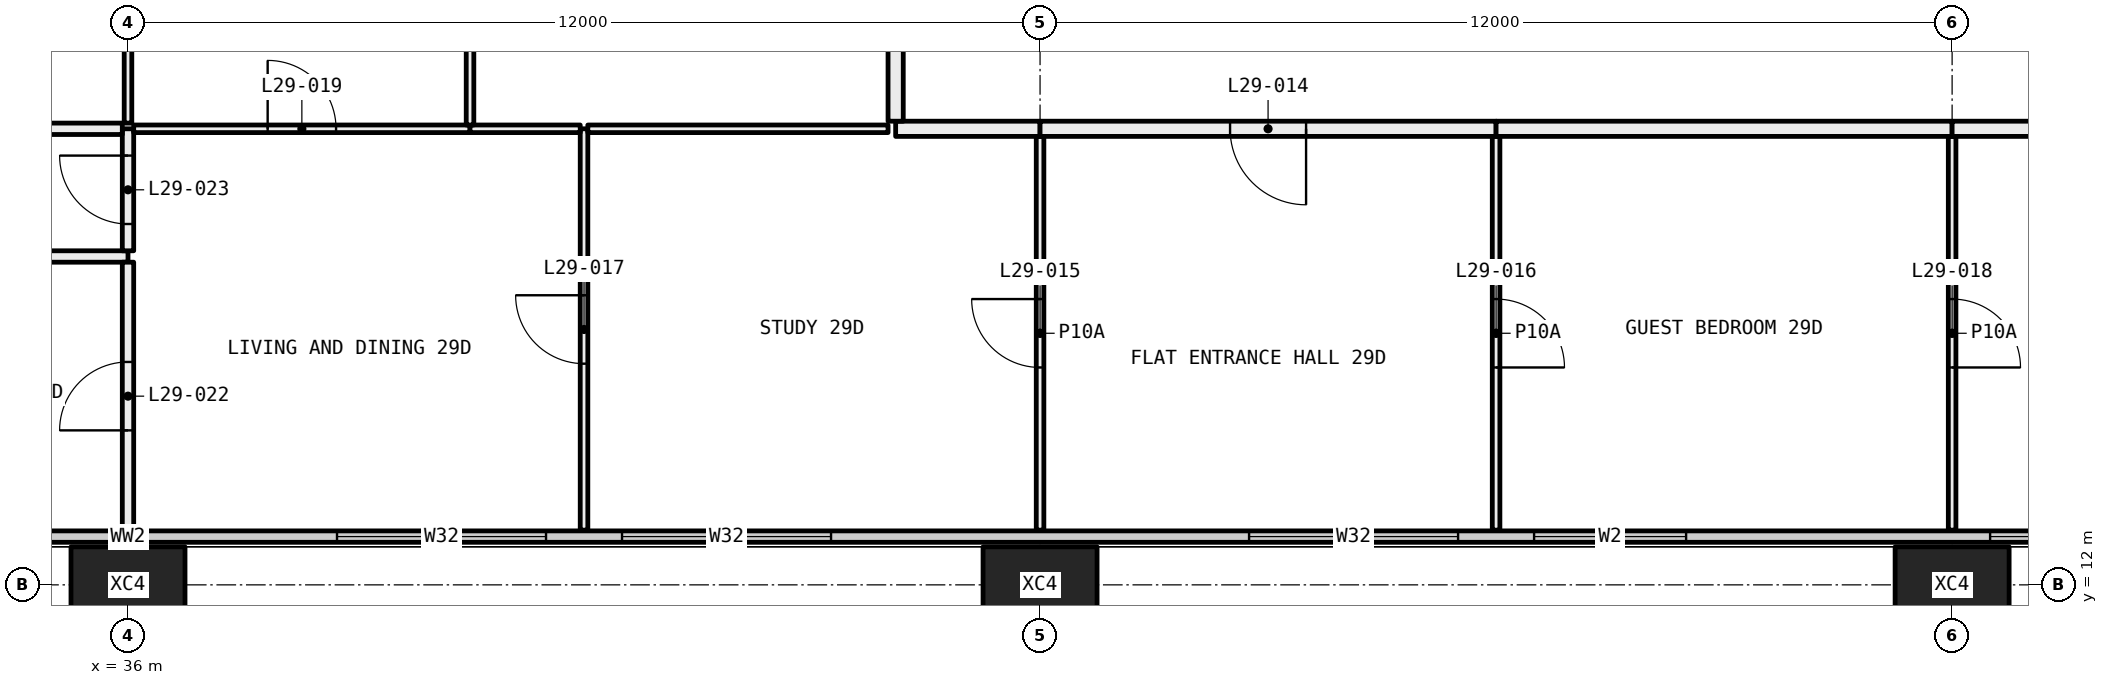
"""IFC4 building model, lengths in metres.
Left out: names, types, materials, properties, quantities, classifications, styles, units other than length and angle.
Written with IfcOpenShell. Run it as: python <this file> out.ifc"""

import sys

from ifc_helpers import new_model, si_unit, direction, frame, frame_2d, origin, origin_2d, place, context, subcontext, project, spatial, rectangle, hollow_rectangle, extrude, element, fill, save


model = new_model("IFC4")
c1 = context("Model", 3, precision=1e-05, world=origin(), true_north=direction((0.0, 1.0)))
c2 = subcontext(c1, "Body", "Model", "MODEL_VIEW")
j1 = project(units=[si_unit("LENGTHUNIT", "METRE"), si_unit("PLANEANGLEUNIT", "RADIAN")], contexts=[c1])
p1 = place(None, origin())
s1 = spatial("IfcSite", under=j1, at=p1, CompositionType="ELEMENT")
p2 = place(p1, origin())
s2 = spatial("IfcBuilding", under=s1, at=p2, CompositionType="ELEMENT")
p3 = place(p2, frame((0.0, 0.0, 113.85)))
s3 = spatial("IfcBuildingStorey", under=s2, at=p3, CompositionType="ELEMENT", Elevation=113.85)
for number, where, z_axis, x_axis in (
    (1, (36.0, 12.0, -0.4), (0.0, 0.0, 1.0), (1.0, 0.0, 0.0)),
    (2, (48.0, 12.0, -0.4), (0.0, 0.0, 1.0), (1.0, 0.0, 0.0)),
    (3, (60.0, 12.0, -0.4), (0.0, 0.0, 1.0), (1.0, 0.0, 0.0)),
):
    element("IfcColumn", number, at=place(p3, frame(where, z_axis=z_axis, x_axis=x_axis)), inside=s3, PredefinedType="COLUMN", context=c2, shape_type="SweptSolid", body=[
        extrude(hollow_rectangle(XDim=1.5, YDim=1.0, WallThickness=0.06, at=origin_2d()), origin(), (0.0, 0.0, 1.0), 3.45),
    ])
p4 = place(p3, frame((6.56, 12.635, 0.0), z_axis=(0.0, 0.0, 1.0), x_axis=(1.0, 0.0, 0.0)))
e4 = element("IfcWall", 4, at=p4, inside=s3, PredefinedType="ELEMENTEDWALL", context=c2, shape_type="SweptSolid", body=[
    extrude(rectangle(XDim=58.88, YDim=0.15, at=frame_2d((29.44, 0.0))), origin(), (0.0, 0.0, 1.0), 3.05),
])
p5 = place(p4, frame((0.44, 0.0, 0.45)))
e5 = element("IfcOpeningElement", 5, at=p5, cuts=e4, PredefinedType="OPENING", context=c2, shape_type="SweptSolid", body=[
    extrude(rectangle(XDim=4.5, YDim=2.55, at=frame_2d((2.25, 1.275))), frame((0.0, 0.085, 0.0), z_axis=(0.0, -1.0, 0.0), x_axis=(1.0, 0.0, 0.0)), (0.0, 0.0, 1.0), 0.17),
])
p6 = place(p4, frame((8.19, 0.0, 0.45)))
e6 = element("IfcOpeningElement", 6, at=p6, cuts=e4, PredefinedType="OPENING", context=c2, shape_type="SweptSolid", body=[
    extrude(rectangle(XDim=2.75, YDim=2.55, at=frame_2d((1.375, 1.275))), frame((0.0, 0.085, 0.0), z_axis=(0.0, -1.0, 0.0), x_axis=(1.0, 0.0, 0.0)), (0.0, 0.0, 1.0), 0.17),
])
p7 = place(p4, frame((11.94, 0.0, 0.45)))
e7 = element("IfcOpeningElement", 7, at=p7, cuts=e4, PredefinedType="OPENING", context=c2, shape_type="SweptSolid", body=[
    extrude(rectangle(XDim=2.75, YDim=2.55, at=frame_2d((1.375, 1.275))), frame((0.0, 0.085, 0.0), z_axis=(0.0, -1.0, 0.0), x_axis=(1.0, 0.0, 0.0)), (0.0, 0.0, 1.0), 0.17),
])
p8 = place(p4, frame((20.19, 0.0, 0.45)))
e8 = element("IfcOpeningElement", 8, at=p8, cuts=e4, PredefinedType="OPENING", context=c2, shape_type="SweptSolid", body=[
    extrude(rectangle(XDim=2.75, YDim=2.55, at=frame_2d((1.375, 1.275))), frame((0.0, 0.085, 0.0), z_axis=(0.0, -1.0, 0.0), x_axis=(1.0, 0.0, 0.0)), (0.0, 0.0, 1.0), 0.17),
])
p9 = place(p4, frame((23.94, 0.0, 0.45)))
e9 = element("IfcOpeningElement", 9, at=p9, cuts=e4, PredefinedType="OPENING", context=c2, shape_type="SweptSolid", body=[
    extrude(rectangle(XDim=2.0, YDim=2.55, at=frame_2d((1.0, 1.275))), frame((0.0, 0.085, 0.0), z_axis=(0.0, -1.0, 0.0), x_axis=(1.0, 0.0, 0.0)), (0.0, 0.0, 1.0), 0.17),
])
p10 = place(p4, frame((32.19, 0.0, 0.45)))
e10 = element("IfcOpeningElement", 10, at=p10, cuts=e4, PredefinedType="OPENING", context=c2, shape_type="SweptSolid", body=[
    extrude(rectangle(XDim=2.75, YDim=2.55, at=frame_2d((1.375, 1.275))), frame((0.0, 0.085, 0.0), z_axis=(0.0, -1.0, 0.0), x_axis=(1.0, 0.0, 0.0)), (0.0, 0.0, 1.0), 0.17),
])
p11 = place(p4, frame((35.94, 0.0, 0.45)))
e11 = element("IfcOpeningElement", 11, at=p11, cuts=e4, PredefinedType="OPENING", context=c2, shape_type="SweptSolid", body=[
    extrude(rectangle(XDim=2.75, YDim=2.55, at=frame_2d((1.375, 1.275))), frame((0.0, 0.085, 0.0), z_axis=(0.0, -1.0, 0.0), x_axis=(1.0, 0.0, 0.0)), (0.0, 0.0, 1.0), 0.17),
])
p12 = place(p4, frame((44.19, 0.0, 0.45)))
e12 = element("IfcOpeningElement", 12, at=p12, cuts=e4, PredefinedType="OPENING", context=c2, shape_type="SweptSolid", body=[
    extrude(rectangle(XDim=2.75, YDim=2.55, at=frame_2d((1.375, 1.275))), frame((0.0, 0.085, 0.0), z_axis=(0.0, -1.0, 0.0), x_axis=(1.0, 0.0, 0.0)), (0.0, 0.0, 1.0), 0.17),
])
p13 = place(p4, frame((47.94, 0.0, 0.45)))
e13 = element("IfcOpeningElement", 13, at=p13, cuts=e4, PredefinedType="OPENING", context=c2, shape_type="SweptSolid", body=[
    extrude(rectangle(XDim=2.0, YDim=2.55, at=frame_2d((1.0, 1.275))), frame((0.0, 0.085, 0.0), z_axis=(0.0, -1.0, 0.0), x_axis=(1.0, 0.0, 0.0)), (0.0, 0.0, 1.0), 0.17),
])
p14 = place(p4, frame((53.94, 0.0, 0.45)))
e14 = element("IfcOpeningElement", 14, at=p14, cuts=e4, PredefinedType="OPENING", context=c2, shape_type="SweptSolid", body=[
    extrude(rectangle(XDim=4.5, YDim=2.55, at=frame_2d((2.25, 1.275))), frame((0.0, 0.085, 0.0), z_axis=(0.0, -1.0, 0.0), x_axis=(1.0, 0.0, 0.0)), (0.0, 0.0, 1.0), 0.17),
])
p15 = place(p3, frame((36.0, 16.32, 0.0), z_axis=(0.0, 0.0, 1.0), x_axis=(-1.0, 0.0, 0.0)))
e15 = element("IfcWall", 15, at=p15, inside=s3, PredefinedType="PARTITIONING", context=c2, shape_type="SweptSolid", body=[
    extrude(rectangle(XDim=5.9, YDim=0.15, at=frame_2d((2.95, 0.0))), origin(), (0.0, 0.0, 1.0), 2.45),
])
p16 = place(p3, frame((36.0, 12.72, 0.0), z_axis=(0.0, 0.0, 1.0), x_axis=(0.0, 1.0, 0.0)))
e16 = element("IfcWall", 16, at=p16, inside=s3, PredefinedType="PARTITIONING", context=c2, shape_type="SweptSolid", body=[
    extrude(rectangle(XDim=3.525, YDim=0.15, at=frame_2d((1.763, 0.0))), origin(), (0.0, 0.0, 1.0), 2.45),
])
p17 = place(p16, frame((1.312, 0.0, 0.0)))
e17 = element("IfcOpeningElement", 17, at=p17, cuts=e16, PredefinedType="OPENING", context=c2, shape_type="SweptSolid", body=[
    extrude(rectangle(XDim=0.9, YDim=2.1, at=frame_2d((0.45, 1.05))), frame((0.0, 0.085, 0.0), z_axis=(0.0, -1.0, 0.0), x_axis=(1.0, 0.0, 0.0)), (0.0, 0.0, 1.0), 0.17),
])
p18 = place(p3, frame((36.0, 16.395, 0.0), z_axis=(0.0, 0.0, 1.0), x_axis=(0.0, 1.0, 0.0)))
e18 = element("IfcWall", 18, at=p18, inside=s3, PredefinedType="PARTITIONING", context=c2, shape_type="SweptSolid", body=[
    extrude(rectangle(XDim=1.605, YDim=0.15, at=frame_2d((0.802, 0.0))), origin(), (0.0, 0.0, 1.0), 2.45),
])
p19 = place(p18, frame((0.353, 0.0, 0.0)))
e19 = element("IfcOpeningElement", 19, at=p19, cuts=e18, PredefinedType="OPENING", context=c2, shape_type="SweptSolid", body=[
    extrude(rectangle(XDim=0.9, YDim=2.1, at=frame_2d((0.45, 1.05))), frame((0.0, 0.085, 0.0), z_axis=(0.0, -1.0, 0.0), x_axis=(1.0, 0.0, 0.0)), (0.0, 0.0, 1.0), 0.17),
])
p20 = place(p3, frame((35.925, 18.0, 0.0), z_axis=(0.0, 0.0, 1.0), x_axis=(-1.0, 0.0, 0.0)))
e20 = element("IfcWall", 20, at=p20, inside=s3, PredefinedType="PARTITIONING", context=c2, shape_type="SweptSolid", body=[
    extrude(rectangle(XDim=5.825, YDim=0.15, at=frame_2d((2.913, 0.0))), origin(), (0.0, 0.0, 1.0), 2.45),
])
p21 = place(p3, frame((42.0, 12.72, 0.0), z_axis=(0.0, 0.0, 1.0), x_axis=(0.0, 1.0, 0.0)))
e21 = element("IfcWall", 21, at=p21, inside=s3, PredefinedType="PARTITIONING", context=c2, shape_type="SweptSolid", body=[
    extrude(rectangle(XDim=5.28, YDim=0.1, at=frame_2d((2.64, 0.0))), origin(), (0.0, 0.0, 1.0), 3.05),
])
p22 = place(p21, frame((2.19, 0.0, 0.0)))
e22 = element("IfcOpeningElement", 22, at=p22, cuts=e21, PredefinedType="OPENING", context=c2, shape_type="SweptSolid", body=[
    extrude(rectangle(XDim=0.9, YDim=2.1, at=frame_2d((0.45, 1.05))), frame((0.0, 0.06, 0.0), z_axis=(0.0, -1.0, 0.0), x_axis=(1.0, 0.0, 0.0)), (0.0, 0.0, 1.0), 0.12),
])
p23 = place(p3, frame((40.5, 18.0, 0.0), z_axis=(0.0, 0.0, 1.0), x_axis=(-1.0, 0.0, 0.0)))
e23 = element("IfcWall", 23, at=p23, inside=s3, PredefinedType="PARTITIONING", context=c2, shape_type="SweptSolid", body=[
    extrude(rectangle(XDim=4.425, YDim=0.1, at=frame_2d((2.212, 0.0))), origin(), (0.0, 0.0, 1.0), 2.45),
])
p24 = place(p23, frame((1.762, 0.0, 0.0)))
e24 = element("IfcOpeningElement", 24, at=p24, cuts=e23, PredefinedType="OPENING", context=c2, shape_type="SweptSolid", body=[
    extrude(rectangle(XDim=0.9, YDim=2.1, at=frame_2d((0.45, 1.05))), frame((0.0, 0.06, 0.0), z_axis=(0.0, -1.0, 0.0), x_axis=(1.0, 0.0, 0.0)), (0.0, 0.0, 1.0), 0.12),
])
p25 = place(p3, frame((41.95, 18.0, 0.0), z_axis=(0.0, 0.0, 1.0), x_axis=(-1.0, 0.0, 0.0)))
e25 = element("IfcWall", 25, at=p25, inside=s3, PredefinedType="PARTITIONING", context=c2, shape_type="SweptSolid", body=[
    extrude(rectangle(XDim=1.45, YDim=0.1, at=frame_2d((0.725, 0.0))), origin(), (0.0, 0.0, 1.0), 3.05),
])
p26 = place(p3, frame((48.0, 12.72, 0.0), z_axis=(0.0, 0.0, 1.0), x_axis=(0.0, 1.0, 0.0)))
e26 = element("IfcWall", 26, at=p26, inside=s3, PredefinedType="PARTITIONING", context=c2, shape_type="SweptSolid", body=[
    extrude(rectangle(XDim=5.18, YDim=0.1, at=frame_2d((2.59, 0.0))), origin(), (0.0, 0.0, 1.0), 3.05),
])
p27 = place(p26, frame((2.14, 0.0, 0.0)))
e27 = element("IfcOpeningElement", 27, at=p27, cuts=e26, PredefinedType="OPENING", context=c2, shape_type="SweptSolid", body=[
    extrude(rectangle(XDim=0.9, YDim=2.1, at=frame_2d((0.45, 1.05))), frame((0.0, 0.06, 0.0), z_axis=(0.0, -1.0, 0.0), x_axis=(1.0, 0.0, 0.0)), (0.0, 0.0, 1.0), 0.12),
])
p28 = place(p3, frame((46.0, 18.0, 0.0), z_axis=(0.0, 0.0, 1.0), x_axis=(-1.0, 0.0, 0.0)))
e28 = element("IfcWall", 28, at=p28, inside=s3, PredefinedType="PARTITIONING", context=c2, shape_type="SweptSolid", body=[
    extrude(rectangle(XDim=3.95, YDim=0.1, at=frame_2d((1.975, 0.0))), origin(), (0.0, 0.0, 1.0), 3.05),
])
p29 = place(p3, frame((48.0, 18.0, 0.0), z_axis=(0.0, 0.0, 1.0), x_axis=(-1.0, 0.0, 0.0)))
e29 = element("IfcWall", 29, at=p29, inside=s3, PredefinedType="PARTITIONING", context=c2, shape_type="SweptSolid", body=[
    extrude(rectangle(XDim=1.9, YDim=0.2, at=frame_2d((0.95, 0.0))), origin(), (0.0, 0.0, 1.0), 3.05),
])
p30 = place(p3, frame((54.0, 12.72, 0.0), z_axis=(0.0, 0.0, 1.0), x_axis=(0.0, 1.0, 0.0)))
e30 = element("IfcWall", 30, at=p30, inside=s3, PredefinedType="PARTITIONING", context=c2, shape_type="SweptSolid", body=[
    extrude(rectangle(XDim=5.18, YDim=0.1, at=frame_2d((2.59, 0.0))), origin(), (0.0, 0.0, 1.0), 3.05),
])
p31 = place(p30, frame((2.14, 0.0, 0.0)))
e31 = element("IfcOpeningElement", 31, at=p31, cuts=e30, PredefinedType="OPENING", context=c2, shape_type="SweptSolid", body=[
    extrude(rectangle(XDim=0.9, YDim=2.1, at=frame_2d((0.45, 1.05))), frame((0.0, 0.06, 0.0), z_axis=(0.0, -1.0, 0.0), x_axis=(1.0, 0.0, 0.0)), (0.0, 0.0, 1.0), 0.12),
])
p32 = place(p3, frame((54.0, 18.0, 0.0), z_axis=(0.0, 0.0, 1.0), x_axis=(-1.0, 0.0, 0.0)))
e32 = element("IfcWall", 32, at=p32, inside=s3, PredefinedType="PARTITIONING", context=c2, shape_type="SweptSolid", body=[
    extrude(rectangle(XDim=6.0, YDim=0.2, at=frame_2d((3.0, 0.0))), origin(), (0.0, 0.0, 1.0), 3.05),
])
p33 = place(p32, frame((2.5, 0.0, 0.0)))
e33 = element("IfcOpeningElement", 33, at=p33, cuts=e32, PredefinedType="OPENING", context=c2, shape_type="SweptSolid", body=[
    extrude(rectangle(XDim=1.0, YDim=2.1, at=frame_2d((0.5, 1.05))), frame((0.0, 0.11, 0.0), z_axis=(0.0, -1.0, 0.0), x_axis=(1.0, 0.0, 0.0)), (0.0, 0.0, 1.0), 0.22),
])
p34 = place(p3, frame((60.0, 12.72, 0.0), z_axis=(0.0, 0.0, 1.0), x_axis=(0.0, 1.0, 0.0)))
e34 = element("IfcWall", 34, at=p34, inside=s3, PredefinedType="PARTITIONING", context=c2, shape_type="SweptSolid", body=[
    extrude(rectangle(XDim=5.18, YDim=0.1, at=frame_2d((2.59, 0.0))), origin(), (0.0, 0.0, 1.0), 3.05),
])
p35 = place(p34, frame((2.14, 0.0, 0.0)))
e35 = element("IfcOpeningElement", 35, at=p35, cuts=e34, PredefinedType="OPENING", context=c2, shape_type="SweptSolid", body=[
    extrude(rectangle(XDim=0.9, YDim=2.1, at=frame_2d((0.45, 1.05))), frame((0.0, 0.06, 0.0), z_axis=(0.0, -1.0, 0.0), x_axis=(1.0, 0.0, 0.0)), (0.0, 0.0, 1.0), 0.12),
])
p36 = place(p3, frame((60.0, 18.0, 0.0), z_axis=(0.0, 0.0, 1.0), x_axis=(-1.0, 0.0, 0.0)))
e36 = element("IfcWall", 36, at=p36, inside=s3, PredefinedType="PARTITIONING", context=c2, shape_type="SweptSolid", body=[
    extrude(rectangle(XDim=6.0, YDim=0.2, at=frame_2d((3.0, 0.0))), origin(), (0.0, 0.0, 1.0), 3.05),
])
p37 = place(p3, frame((61.9, 18.0, 0.0), z_axis=(0.0, 0.0, 1.0), x_axis=(-1.0, 0.0, 0.0)))
e37 = element("IfcWall", 37, at=p37, inside=s3, PredefinedType="PARTITIONING", context=c2, shape_type="SweptSolid", body=[
    extrude(rectangle(XDim=1.9, YDim=0.2, at=frame_2d((0.95, 0.0))), origin(), (0.0, 0.0, 1.0), 3.05),
])
p38 = place(p3, frame((36.0, 18.075, 0.0), z_axis=(0.0, 0.0, 1.0), x_axis=(0.0, 1.0, 0.0)))
e38 = element("IfcWall", 38, at=p38, inside=s3, PredefinedType="PARTITIONING", context=c2, shape_type="SweptSolid", body=[
    extrude(rectangle(XDim=5.175, YDim=0.1, at=frame_2d((2.587, 0.0))), origin(), (0.0, 0.0, 1.0), 2.45),
])
p39 = place(p38, frame((2.137, 0.0, 0.0)))
e39 = element("IfcOpeningElement", 39, at=p39, cuts=e38, PredefinedType="OPENING", context=c2, shape_type="SweptSolid", body=[
    extrude(rectangle(XDim=0.9, YDim=2.1, at=frame_2d((0.45, 1.05))), frame((0.0, 0.06, 0.0), z_axis=(0.0, -1.0, 0.0), x_axis=(1.0, 0.0, 0.0)), (0.0, 0.0, 1.0), 0.12),
])
p40 = place(p3, frame((40.5, 18.05, 0.0), z_axis=(0.0, 0.0, 1.0), x_axis=(0.0, 1.0, 0.0)))
e40 = element("IfcWall", 40, at=p40, inside=s3, PredefinedType="PARTITIONING", context=c2, shape_type="SweptSolid", body=[
    extrude(rectangle(XDim=6.25, YDim=0.1, at=frame_2d((3.125, 0.0))), origin(), (0.0, 0.0, 1.0), 2.45),
])
p41 = place(p40, frame((2.675, 0.0, 0.0)))
e41 = element("IfcOpeningElement", 41, at=p41, cuts=e40, PredefinedType="OPENING", context=c2, shape_type="SweptSolid", body=[
    extrude(rectangle(XDim=0.9, YDim=2.1, at=frame_2d((0.45, 1.05))), frame((0.0, 0.06, 0.0), z_axis=(0.0, -1.0, 0.0), x_axis=(1.0, 0.0, 0.0)), (0.0, 0.0, 1.0), 0.12),
])
p42 = place(p3, frame((46.1, 18.1, 0.0), z_axis=(0.0, 0.0, 1.0), x_axis=(0.0, 1.0, 0.0)))
e42 = element("IfcWall", 42, at=p42, inside=s3, PredefinedType="PARTITIONING", context=c2, shape_type="SweptSolid", body=[
    extrude(rectangle(XDim=6.2, YDim=0.2, at=frame_2d((3.1, 0.0))), origin(), (0.0, 0.0, 1.0), 2.45),
])
p43 = place(p10, origin())
e43 = element("IfcWindow", 43, at=p43, inside=s3, PartitioningType="SINGLE_PANEL", PredefinedType="WINDOW", context=c2, shape_type="SweptSolid", body=[
    extrude(rectangle(XDim=2.75, YDim=2.55, at=frame_2d((1.375, 1.275))), frame((0.0, 0.03, 0.0), z_axis=(0.0, -1.0, 0.0), x_axis=(1.0, 0.0, 0.0)), (0.0, 0.0, 1.0), 0.06),
])
fill(e10, e43)
p44 = place(p11, origin())
e44 = element("IfcWindow", 44, at=p44, inside=s3, PartitioningType="SINGLE_PANEL", PredefinedType="WINDOW", context=c2, shape_type="SweptSolid", body=[
    extrude(rectangle(XDim=2.75, YDim=2.55, at=frame_2d((1.375, 1.275))), frame((0.0, 0.03, 0.0), z_axis=(0.0, -1.0, 0.0), x_axis=(1.0, 0.0, 0.0)), (0.0, 0.0, 1.0), 0.06),
])
fill(e11, e44)
p45 = place(p12, origin())
e45 = element("IfcWindow", 45, at=p45, inside=s3, PartitioningType="SINGLE_PANEL", PredefinedType="WINDOW", context=c2, shape_type="SweptSolid", body=[
    extrude(rectangle(XDim=2.75, YDim=2.55, at=frame_2d((1.375, 1.275))), frame((0.0, 0.03, 0.0), z_axis=(0.0, -1.0, 0.0), x_axis=(1.0, 0.0, 0.0)), (0.0, 0.0, 1.0), 0.06),
])
fill(e12, e45)
p46 = place(p13, origin())
e46 = element("IfcWindow", 46, at=p46, inside=s3, PartitioningType="SINGLE_PANEL", PredefinedType="WINDOW", context=c2, shape_type="SweptSolid", body=[
    extrude(rectangle(XDim=2.0, YDim=2.55, at=frame_2d((1.0, 1.275))), frame((0.0, 0.03, 0.0), z_axis=(0.0, -1.0, 0.0), x_axis=(1.0, 0.0, 0.0)), (0.0, 0.0, 1.0), 0.06),
])
fill(e13, e46)
p47 = place(p14, origin())
e47 = element("IfcWindow", 47, at=p47, inside=s3, PartitioningType="SINGLE_PANEL", PredefinedType="WINDOW", context=c2, shape_type="SweptSolid", body=[
    extrude(rectangle(XDim=4.5, YDim=2.55, at=frame_2d((2.25, 1.275))), frame((0.0, 0.03, 0.0), z_axis=(0.0, -1.0, 0.0), x_axis=(1.0, 0.0, 0.0)), (0.0, 0.0, 1.0), 0.06),
])
fill(e14, e47)
p48 = place(p33, origin())
e48 = element("IfcDoor", 48, at=p48, inside=s3, OperationType="SINGLE_SWING_RIGHT", PredefinedType="DOOR", context=c2, shape_type="SweptSolid", body=[
    extrude(rectangle(XDim=1.0, YDim=2.1, at=frame_2d((0.5, 1.05))), frame((0.0, 0.025, 0.0), z_axis=(0.0, -1.0, 0.0), x_axis=(1.0, 0.0, 0.0)), (0.0, 0.0, 1.0), 0.05),
])
fill(e33, e48)
p49 = place(p27, origin())
e49 = element("IfcDoor", 49, at=p49, inside=s3, OperationType="SINGLE_SWING_LEFT", PredefinedType="DOOR", context=c2, shape_type="SweptSolid", body=[
    extrude(rectangle(XDim=0.9, YDim=2.1, at=frame_2d((0.45, 1.05))), frame((0.0, 0.025, 0.0), z_axis=(0.0, -1.0, 0.0), x_axis=(1.0, 0.0, 0.0)), (0.0, 0.0, 1.0), 0.05),
])
fill(e27, e49)
p50 = place(p31, frame((0.9, 0.0, 0.0), x_axis=(-1.0, 0.0, 0.0)))
e50 = element("IfcDoor", 50, at=p50, inside=s3, OperationType="SINGLE_SWING_LEFT", PredefinedType="DOOR", context=c2, shape_type="SweptSolid", body=[
    extrude(rectangle(XDim=0.9, YDim=2.1, at=frame_2d((0.45, 1.05))), frame((0.0, 0.025, 0.0), z_axis=(0.0, -1.0, 0.0), x_axis=(1.0, 0.0, 0.0)), (0.0, 0.0, 1.0), 0.05),
])
fill(e31, e50)
p51 = place(p22, origin())
e51 = element("IfcDoor", 51, at=p51, inside=s3, OperationType="SINGLE_SWING_LEFT", PredefinedType="DOOR", context=c2, shape_type="SweptSolid", body=[
    extrude(rectangle(XDim=0.9, YDim=2.1, at=frame_2d((0.45, 1.05))), frame((0.0, 0.025, 0.0), z_axis=(0.0, -1.0, 0.0), x_axis=(1.0, 0.0, 0.0)), (0.0, 0.0, 1.0), 0.05),
])
fill(e22, e51)
p52 = place(p35, frame((0.9, 0.0, 0.0), x_axis=(-1.0, 0.0, 0.0)))
e52 = element("IfcDoor", 52, at=p52, inside=s3, OperationType="SINGLE_SWING_LEFT", PredefinedType="DOOR", context=c2, shape_type="SweptSolid", body=[
    extrude(rectangle(XDim=0.9, YDim=2.1, at=frame_2d((0.45, 1.05))), frame((0.0, 0.025, 0.0), z_axis=(0.0, -1.0, 0.0), x_axis=(1.0, 0.0, 0.0)), (0.0, 0.0, 1.0), 0.05),
])
fill(e35, e52)
p53 = place(p24, frame((0.9, 0.0, 0.0), x_axis=(-1.0, 0.0, 0.0)))
e53 = element("IfcDoor", 53, at=p53, inside=s3, OperationType="SINGLE_SWING_RIGHT", PredefinedType="DOOR", context=c2, shape_type="SweptSolid", body=[
    extrude(rectangle(XDim=0.9, YDim=2.1, at=frame_2d((0.45, 1.05))), frame((0.0, 0.025, 0.0), z_axis=(0.0, -1.0, 0.0), x_axis=(1.0, 0.0, 0.0)), (0.0, 0.0, 1.0), 0.05),
])
fill(e24, e53)
p54 = place(p17, origin())
e54 = element("IfcDoor", 54, at=p54, inside=s3, OperationType="SINGLE_SWING_RIGHT", PredefinedType="DOOR", context=c2, shape_type="SweptSolid", body=[
    extrude(rectangle(XDim=0.9, YDim=2.1, at=frame_2d((0.45, 1.05))), frame((0.0, 0.025, 0.0), z_axis=(0.0, -1.0, 0.0), x_axis=(1.0, 0.0, 0.0)), (0.0, 0.0, 1.0), 0.05),
])
fill(e17, e54)
p55 = place(p19, origin())
e55 = element("IfcDoor", 55, at=p55, inside=s3, OperationType="SINGLE_SWING_LEFT", PredefinedType="DOOR", context=c2, shape_type="SweptSolid", body=[
    extrude(rectangle(XDim=0.9, YDim=2.1, at=frame_2d((0.45, 1.05))), frame((0.0, 0.025, 0.0), z_axis=(0.0, -1.0, 0.0), x_axis=(1.0, 0.0, 0.0)), (0.0, 0.0, 1.0), 0.05),
])
fill(e19, e55)
save(model, sys.argv[1])
